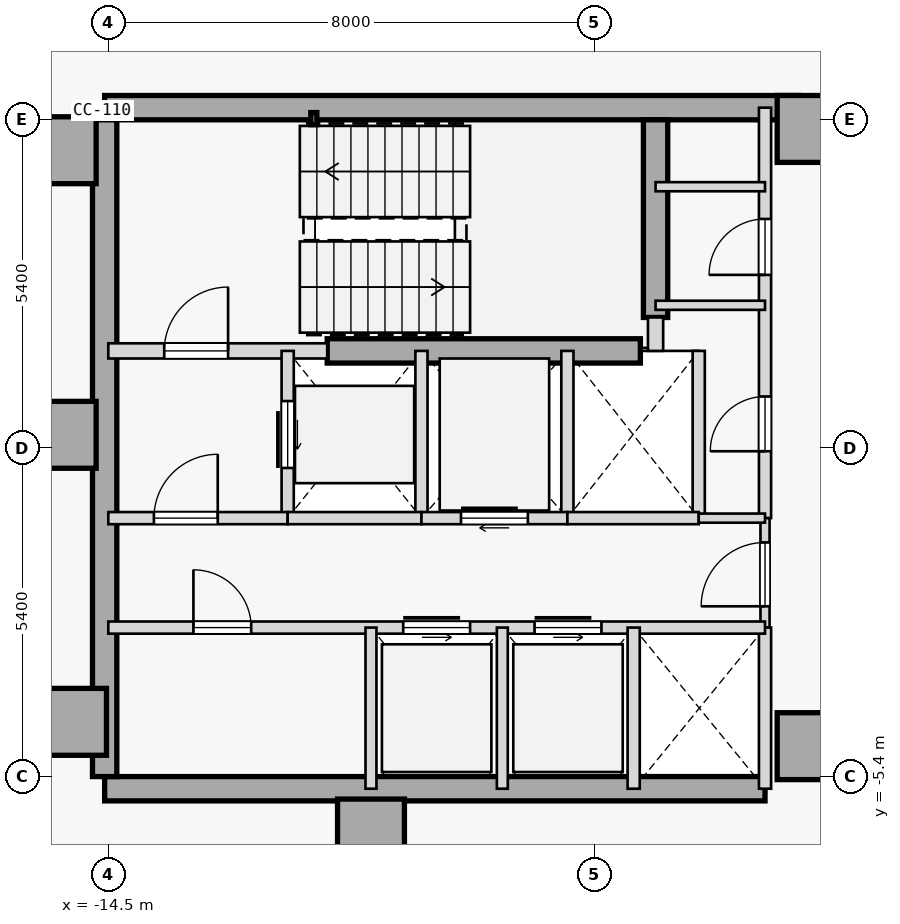
"""IFC4 building model, lengths in metres.
Left out: names, types, materials, properties, quantities, classifications, styles, units other than length and angle.
Written with IfcOpenShell. Run it as: python <this file> out.ifc"""

import sys

from ifc_helpers import new_model, si_unit, direction, frame, frame_2d, origin, origin_2d, place, context, subcontext, project, spatial, rectangle, hollow_rectangle, extrude, element, fill, save


model = new_model("IFC4")
c1 = context("Model", 3, precision=1e-05, world=origin(), true_north=direction((0.0, 1.0)))
c2 = subcontext(c1, "Body", "Model", "MODEL_VIEW")
j1 = project(units=[si_unit("LENGTHUNIT", "METRE"), si_unit("PLANEANGLEUNIT", "RADIAN")], contexts=[c1])
p1 = place(None, origin())
s1 = spatial("IfcSite", under=j1, at=p1, CompositionType="ELEMENT")
p2 = place(p1, origin())
s2 = spatial("IfcBuilding", under=s1, at=p2, CompositionType="ELEMENT")
p3 = place(p2, frame((0.0, 0.0, 113.3)))
s3 = spatial("IfcBuildingStorey", under=s2, at=p3, CompositionType="ELEMENT", Elevation=113.3)
for number, where, z_axis, x_axis in (
    (1, (-15.25, 4.9, 0.0), (0.0, 0.0, 1.0), (1.0, 0.0, 0.0)),
    (2, (-15.25, 0.22, 0.0), (0.0, 0.0, 1.0), (1.0, 0.0, 0.0)),
    (3, (-15.08, -4.5, 0.0), (0.0, 0.0, 1.0), (1.0, 0.0, 0.0)),
    (4, (-10.18, -6.32, 0.0), (0.0, 0.0, 1.0), (1.0, 0.0, 0.0)),
    (5, (-2.95, -4.9, 0.0), (0.0, 0.0, 1.0), (1.0, 0.0, 0.0)),
    (6, (-2.95, 5.25, 0.0), (0.0, 0.0, 1.0), (1.0, 0.0, 0.0)),
):
    element("IfcColumn", number, at=place(p3, frame(where, z_axis=z_axis, x_axis=x_axis)), inside=s3, PredefinedType="COLUMN", context=c2, shape_type="SweptSolid", body=[
        extrude(rectangle(XDim=1.1, YDim=1.1, at=origin_2d()), origin(), (0.0, 0.0, 1.0), 3.7),
    ])
p4 = place(p3, frame((-14.56, 5.6, 0.0), z_axis=(0.0, 0.0, 1.0), x_axis=(1.0, 0.0, 0.0)))
e7 = element("IfcWall", 7, at=p4, inside=s3, PredefinedType="SHEAR", context=c2, shape_type="SweptSolid", body=[
    extrude(rectangle(XDim=11.41, YDim=0.4, at=frame_2d((5.705, 0.0))), origin(), (0.0, 0.0, 1.0), 3.475),
])
p5 = place(p3, frame((-14.56, -5.6, 0.0), z_axis=(0.0, 0.0, 1.0), x_axis=(1.0, 0.0, 0.0)))
e8 = element("IfcWall", 8, at=p5, inside=s3, PredefinedType="SHEAR", context=c2, shape_type="SweptSolid", body=[
    extrude(rectangle(XDim=10.86, YDim=0.4, at=frame_2d((5.43, 0.0))), origin(), (0.0, 0.0, 1.0), 3.475),
])
p6 = place(p3, frame((-14.56, -5.4, 0.0), z_axis=(0.0, 0.0, 1.0), x_axis=(0.0, 1.0, 0.0)))
e9 = element("IfcWall", 9, at=p6, inside=s3, PredefinedType="SHEAR", context=c2, shape_type="SweptSolid", body=[
    extrude(rectangle(XDim=10.8, YDim=0.4, at=frame_2d((5.4, 0.0))), origin(), (0.0, 0.0, 1.0), 3.475),
])
p7 = place(p3, frame((-5.5, 2.15, 0.0), z_axis=(0.0, 0.0, 1.0), x_axis=(0.0, 1.0, 0.0)))
e10 = element("IfcWall", 10, at=p7, inside=s3, PredefinedType="SHEAR", context=c2, shape_type="SweptSolid", body=[
    extrude(rectangle(XDim=3.25, YDim=0.4, at=frame_2d((1.625, 0.0))), origin(), (0.0, 0.0, 1.0), 3.475),
])
p8 = place(p3, frame((-10.9, 1.6, 0.0), z_axis=(0.0, 0.0, 1.0), x_axis=(1.0, 0.0, 0.0)))
e11 = element("IfcWall", 11, at=p8, inside=s3, PredefinedType="SHEAR", context=c2, shape_type="SweptSolid", body=[
    extrude(rectangle(XDim=5.15, YDim=0.4, at=frame_2d((2.575, 0.0))), origin(), (0.0, 0.0, 1.0), 3.475),
])
p9 = place(p3, frame((-11.12, 5.42, 0.0), z_axis=(0.0, 0.0, 1.0), x_axis=(1.0, 0.0, 0.0)))
e12 = element("IfcColumn", 12, at=p9, inside=s3, PredefinedType="COLUMN", context=c2, shape_type="SweptSolid", body=[
    extrude(hollow_rectangle(XDim=0.1, YDim=0.2, WallThickness=0.008, at=origin_2d()), origin(), (0.0, 0.0, 1.0), 3.7),
])
p10 = place(p3, frame((-14.5, 1.6, 0.0), z_axis=(0.0, 0.0, 1.0), x_axis=(1.0, 0.0, 0.0)))
e13 = element("IfcWall", 13, at=p10, inside=s3, PredefinedType="STANDARD", context=c2, shape_type="SweptSolid", body=[
    extrude(rectangle(XDim=3.6, YDim=0.25, at=frame_2d((1.8, 0.0))), origin(), (0.0, 0.0, 1.0), 3.475),
])
p11 = place(p10, frame((0.92, 0.0, 0.0)))
e14 = element("IfcOpeningElement", 14, at=p11, cuts=e13, PredefinedType="OPENING", context=c2, shape_type="SweptSolid", body=[
    extrude(rectangle(XDim=1.05, YDim=2.15, at=frame_2d((0.525, 1.075))), frame((0.0, 0.135, 0.0), z_axis=(0.0, -1.0, 0.0), x_axis=(1.0, 0.0, 0.0)), (0.0, 0.0, 1.0), 0.27),
])
p12 = place(p3, frame((-5.5, 1.6, 0.0), z_axis=(0.0, 0.0, 1.0), x_axis=(0.0, 1.0, 0.0)))
e15 = element("IfcWall", 15, at=p12, inside=s3, PredefinedType="STANDARD", context=c2, shape_type="SweptSolid", body=[
    extrude(rectangle(XDim=0.55, YDim=0.25, at=frame_2d((0.275, 0.0))), origin(), (0.0, 0.0, 1.0), 3.475),
])
p13 = place(p3, frame((-3.7, -1.15, 0.0), z_axis=(0.0, 0.0, 1.0), x_axis=(0.0, 1.0, 0.0)))
e16 = element("IfcWall", 16, at=p13, inside=s3, PredefinedType="STANDARD", context=c2, shape_type="SweptSolid", body=[
    extrude(rectangle(XDim=6.75, YDim=0.2, at=frame_2d((3.375, 0.0))), origin(), (0.0, 0.0, 1.0), 3.475),
])
p14 = place(p13, frame((1.1, 0.0, 0.0)))
e17 = element("IfcOpeningElement", 17, at=p14, cuts=e16, PredefinedType="OPENING", context=c2, shape_type="SweptSolid", body=[
    extrude(rectangle(XDim=0.9, YDim=2.15, at=frame_2d((0.45, 1.075))), frame((0.0, 0.11, 0.0), z_axis=(0.0, -1.0, 0.0), x_axis=(1.0, 0.0, 0.0)), (0.0, 0.0, 1.0), 0.22),
])
p15 = place(p13, frame((4.0, 0.0, 0.0)))
e18 = element("IfcOpeningElement", 18, at=p15, cuts=e16, PredefinedType="OPENING", context=c2, shape_type="SweptSolid", body=[
    extrude(rectangle(XDim=0.92, YDim=2.15, at=frame_2d((0.46, 1.075))), frame((0.0, 0.11, 0.0), z_axis=(0.0, -1.0, 0.0), x_axis=(1.0, 0.0, 0.0)), (0.0, 0.0, 1.0), 0.22),
])
p16 = place(p3, frame((-3.7, -2.95, 0.0), z_axis=(0.0, 0.0, 1.0), x_axis=(0.0, 1.0, 0.0)))
e19 = element("IfcWall", 19, at=p16, inside=s3, PredefinedType="PARTITIONING", context=c2, shape_type="SweptSolid", body=[
    extrude(rectangle(XDim=1.8, YDim=0.15, at=frame_2d((0.9, 0.0))), origin(), (0.0, 0.0, 1.0), 3.475),
])
p17 = place(p16, frame((0.35, 0.0, 0.0)))
e20 = element("IfcOpeningElement", 20, at=p17, cuts=e19, PredefinedType="OPENING", context=c2, shape_type="SweptSolid", body=[
    extrude(rectangle(XDim=1.05, YDim=2.18, at=frame_2d((0.525, 1.09))), frame((0.0, 0.085, 0.0), z_axis=(0.0, -1.0, 0.0), x_axis=(1.0, 0.0, 0.0)), (0.0, 0.0, 1.0), 0.17),
])
p18 = place(p3, frame((-3.7, -5.6, 0.0), z_axis=(0.0, 0.0, 1.0), x_axis=(0.0, 1.0, 0.0)))
e21 = element("IfcWall", 21, at=p18, inside=s3, PredefinedType="STANDARD", context=c2, shape_type="SweptSolid", body=[
    extrude(rectangle(XDim=2.65, YDim=0.2, at=frame_2d((1.325, 0.0))), origin(), (0.0, 0.0, 1.0), 3.475),
])
p19 = place(p3, frame((-11.55, -1.15, 0.0), z_axis=(0.0, 0.0, 1.0), x_axis=(0.0, 1.0, 0.0)))
e22 = element("IfcWall", 22, at=p19, inside=s3, PredefinedType="STANDARD", context=c2, shape_type="SweptSolid", body=[
    extrude(rectangle(XDim=2.75, YDim=0.2, at=frame_2d((1.375, 0.0))), origin(), (0.0, 0.0, 1.0), 3.475),
])
p20 = place(p19, frame((0.825, 0.0, 0.0)))
e23 = element("IfcOpeningElement", 23, at=p20, cuts=e22, PredefinedType="OPENING", context=c2, shape_type="SweptSolid", body=[
    extrude(rectangle(XDim=1.1, YDim=2.15, at=frame_2d((0.55, 1.075))), frame((0.0, 0.11, 0.0), z_axis=(0.0, -1.0, 0.0), x_axis=(1.0, 0.0, 0.0)), (0.0, 0.0, 1.0), 0.22),
])
p21 = place(p3, frame((-9.35, -1.15, 0.0), z_axis=(0.0, 0.0, 1.0), x_axis=(0.0, 1.0, 0.0)))
e24 = element("IfcWall", 24, at=p21, inside=s3, PredefinedType="STANDARD", context=c2, shape_type="SweptSolid", body=[
    extrude(rectangle(XDim=2.75, YDim=0.2, at=frame_2d((1.375, 0.0))), origin(), (0.0, 0.0, 1.0), 3.475),
])
p22 = place(p3, frame((-14.5, -1.15, 0.0), z_axis=(0.0, 0.0, 1.0), x_axis=(1.0, 0.0, 0.0)))
e25 = element("IfcWall", 25, at=p22, inside=s3, PredefinedType="STANDARD", context=c2, shape_type="SweptSolid", body=[
    extrude(rectangle(XDim=2.95, YDim=0.2, at=frame_2d((1.475, 0.0))), origin(), (0.0, 0.0, 1.0), 3.475),
])
p23 = place(p22, frame((0.75, 0.0, 0.0)))
e26 = element("IfcOpeningElement", 26, at=p23, cuts=e25, PredefinedType="OPENING", context=c2, shape_type="SweptSolid", body=[
    extrude(rectangle(XDim=1.05, YDim=2.18, at=frame_2d((0.525, 1.09))), frame((0.0, 0.11, 0.0), z_axis=(0.0, -1.0, 0.0), x_axis=(1.0, 0.0, 0.0)), (0.0, 0.0, 1.0), 0.22),
])
p24 = place(p3, frame((-11.55, -1.15, 0.0), z_axis=(0.0, 0.0, 1.0), x_axis=(1.0, 0.0, 0.0)))
e27 = element("IfcWall", 27, at=p24, inside=s3, PredefinedType="STANDARD", context=c2, shape_type="SweptSolid", body=[
    extrude(rectangle(XDim=2.2, YDim=0.2, at=frame_2d((1.1, 0.0))), origin(), (0.0, 0.0, 1.0), 3.475),
])
p25 = place(p3, frame((-6.95, -1.15, 0.0), z_axis=(0.0, 0.0, 1.0), x_axis=(0.0, 1.0, 0.0)))
e28 = element("IfcWall", 28, at=p25, inside=s3, PredefinedType="STANDARD", context=c2, shape_type="SweptSolid", body=[
    extrude(rectangle(XDim=2.75, YDim=0.2, at=frame_2d((1.375, 0.0))), origin(), (0.0, 0.0, 1.0), 3.475),
])
p26 = place(p3, frame((-9.35, -1.15, 0.0), z_axis=(0.0, 0.0, 1.0), x_axis=(1.0, 0.0, 0.0)))
e29 = element("IfcWall", 29, at=p26, inside=s3, PredefinedType="STANDARD", context=c2, shape_type="SweptSolid", body=[
    extrude(rectangle(XDim=2.4, YDim=0.2, at=frame_2d((1.2, 0.0))), origin(), (0.0, 0.0, 1.0), 3.475),
])
p27 = place(p26, frame((0.65, 0.0, 0.0)))
e30 = element("IfcOpeningElement", 30, at=p27, cuts=e29, PredefinedType="OPENING", context=c2, shape_type="SweptSolid", body=[
    extrude(rectangle(XDim=1.1, YDim=2.15, at=frame_2d((0.55, 1.075))), frame((0.0, 0.11, 0.0), z_axis=(0.0, -1.0, 0.0), x_axis=(1.0, 0.0, 0.0)), (0.0, 0.0, 1.0), 0.22),
])
p28 = place(p3, frame((-4.79, -1.15, 0.0), z_axis=(0.0, 0.0, 1.0), x_axis=(0.0, 1.0, 0.0)))
e31 = element("IfcWall", 31, at=p28, inside=s3, PredefinedType="STANDARD", context=c2, shape_type="SweptSolid", body=[
    extrude(rectangle(XDim=2.75, YDim=0.2, at=frame_2d((1.375, 0.0))), origin(), (0.0, 0.0, 1.0), 3.475),
])
p29 = place(p3, frame((-6.95, -1.15, 0.0), z_axis=(0.0, 0.0, 1.0), x_axis=(1.0, 0.0, 0.0)))
e32 = element("IfcWall", 32, at=p29, inside=s3, PredefinedType="STANDARD", context=c2, shape_type="SweptSolid", body=[
    extrude(rectangle(XDim=2.16, YDim=0.2, at=frame_2d((1.08, 0.0))), origin(), (0.0, 0.0, 1.0), 3.475),
])
p30 = place(p3, frame((-4.79, -1.15, 0.0), z_axis=(0.0, 0.0, 1.0), x_axis=(1.0, 0.0, 0.0)))
e33 = element("IfcWall", 33, at=p30, inside=s3, PredefinedType="PARTITIONING", context=c2, shape_type="SweptSolid", body=[
    extrude(rectangle(XDim=1.09, YDim=0.15, at=frame_2d((0.545, 0.0))), origin(), (0.0, 0.0, 1.0), 3.475),
])
p31 = place(p3, frame((-14.5, -2.95, 0.0), z_axis=(0.0, 0.0, 1.0), x_axis=(1.0, 0.0, 0.0)))
e34 = element("IfcWall", 34, at=p31, inside=s3, PredefinedType="STANDARD", context=c2, shape_type="SweptSolid", body=[
    extrude(rectangle(XDim=10.8, YDim=0.2, at=frame_2d((5.4, 0.0))), origin(), (0.0, 0.0, 1.0), 3.475),
])
p32 = place(p31, frame((4.85, 0.0, 0.0)))
e35 = element("IfcOpeningElement", 35, at=p32, cuts=e34, PredefinedType="OPENING", context=c2, shape_type="SweptSolid", body=[
    extrude(rectangle(XDim=1.1, YDim=2.15, at=frame_2d((0.55, 1.075))), frame((0.0, 0.11, 0.0), z_axis=(0.0, -1.0, 0.0), x_axis=(1.0, 0.0, 0.0)), (0.0, 0.0, 1.0), 0.22),
])
p33 = place(p31, frame((7.01, 0.0, 0.0)))
e36 = element("IfcOpeningElement", 36, at=p33, cuts=e34, PredefinedType="OPENING", context=c2, shape_type="SweptSolid", body=[
    extrude(rectangle(XDim=1.1, YDim=2.15, at=frame_2d((0.55, 1.075))), frame((0.0, 0.11, 0.0), z_axis=(0.0, -1.0, 0.0), x_axis=(1.0, 0.0, 0.0)), (0.0, 0.0, 1.0), 0.22),
])
p34 = place(p31, frame((1.4, 0.0, 0.0)))
e37 = element("IfcOpeningElement", 37, at=p34, cuts=e34, PredefinedType="OPENING", context=c2, shape_type="SweptSolid", body=[
    extrude(rectangle(XDim=0.95, YDim=2.15, at=frame_2d((0.475, 1.075))), frame((0.0, 0.11, 0.0), z_axis=(0.0, -1.0, 0.0), x_axis=(1.0, 0.0, 0.0)), (0.0, 0.0, 1.0), 0.22),
])
p35 = place(p3, frame((-5.86, -5.6, 0.0), z_axis=(0.0, 0.0, 1.0), x_axis=(0.0, 1.0, 0.0)))
e38 = element("IfcWall", 38, at=p35, inside=s3, PredefinedType="STANDARD", context=c2, shape_type="SweptSolid", body=[
    extrude(rectangle(XDim=2.65, YDim=0.2, at=frame_2d((1.325, 0.0))), origin(), (0.0, 0.0, 1.0), 3.475),
])
for number, where, z_axis, x_axis in (
    (39, (-10.18, -5.6, 0.0), (0.0, 0.0, 1.0), (0.0, 1.0, 0.0)),
    (40, (-8.02, -5.6, 0.0), (0.0, 0.0, 1.0), (0.0, 1.0, 0.0)),
):
    element("IfcWall", number, at=place(p3, frame(where, z_axis=z_axis, x_axis=x_axis)), inside=s3, PredefinedType="STANDARD", context=c2, shape_type="SweptSolid", body=[
        extrude(rectangle(XDim=2.65, YDim=0.18, at=frame_2d((1.325, 0.0))), origin(), (0.0, 0.0, 1.0), 3.475),
    ])
for number, where, z_axis, x_axis in (
    (41, (-5.5, 4.3, 0.0), (0.0, 0.0, 1.0), (1.0, 0.0, 0.0)),
    (42, (-5.5, 2.35, 0.0), (0.0, 0.0, 1.0), (1.0, 0.0, 0.0)),
):
    element("IfcWall", number, at=place(p3, frame(where, z_axis=z_axis, x_axis=x_axis)), inside=s3, PredefinedType="PARTITIONING", context=c2, shape_type="SweptSolid", body=[
        extrude(rectangle(XDim=1.8, YDim=0.15, at=frame_2d((0.9, 0.0))), origin(), (0.0, 0.0, 1.0), 3.475),
    ])
p36 = place(p11, origin())
e43 = element("IfcDoor", 43, at=p36, inside=s3, OperationType="SINGLE_SWING_RIGHT", PredefinedType="DOOR", context=c2, shape_type="SweptSolid", body=[
    extrude(rectangle(XDim=1.05, YDim=2.15, at=frame_2d((0.525, 1.075))), frame((0.0, 0.025, 0.0), z_axis=(0.0, -1.0, 0.0), x_axis=(1.0, 0.0, 0.0)), (0.0, 0.0, 1.0), 0.05),
])
fill(e14, e43)
p37 = place(p23, origin())
e44 = element("IfcDoor", 44, at=p37, inside=s3, OperationType="SINGLE_SWING_RIGHT", PredefinedType="DOOR", context=c2, shape_type="SweptSolid", body=[
    extrude(rectangle(XDim=1.05, YDim=2.18, at=frame_2d((0.525, 1.09))), frame((0.0, 0.025, 0.0), z_axis=(0.0, -1.0, 0.0), x_axis=(1.0, 0.0, 0.0)), (0.0, 0.0, 1.0), 0.05),
])
fill(e26, e44)
p38 = place(p17, origin())
e45 = element("IfcDoor", 45, at=p38, inside=s3, OperationType="SINGLE_SWING_LEFT", PredefinedType="DOOR", context=c2, shape_type="SweptSolid", body=[
    extrude(rectangle(XDim=1.05, YDim=2.18, at=frame_2d((0.525, 1.09))), frame((0.0, 0.025, 0.0), z_axis=(0.0, -1.0, 0.0), x_axis=(1.0, 0.0, 0.0)), (0.0, 0.0, 1.0), 0.05),
])
fill(e20, e45)
p39 = place(p20, origin())
e46 = element("IfcDoor", 46, at=p39, inside=s3, OperationType="SLIDING_TO_RIGHT", PredefinedType="DOOR", context=c2, shape_type="SweptSolid", body=[
    extrude(rectangle(XDim=1.1, YDim=2.15, at=frame_2d((0.55, 1.075))), frame((0.0, 0.025, 0.0), z_axis=(0.0, -1.0, 0.0), x_axis=(1.0, 0.0, 0.0)), (0.0, 0.0, 1.0), 0.05),
])
fill(e23, e46)
p40 = place(p27, origin())
e47 = element("IfcDoor", 47, at=p40, inside=s3, OperationType="SLIDING_TO_RIGHT", PredefinedType="DOOR", context=c2, shape_type="SweptSolid", body=[
    extrude(rectangle(XDim=1.1, YDim=2.15, at=frame_2d((0.55, 1.075))), frame((0.0, 0.025, 0.0), z_axis=(0.0, -1.0, 0.0), x_axis=(1.0, 0.0, 0.0)), (0.0, 0.0, 1.0), 0.05),
])
fill(e30, e47)
p41 = place(p32, origin())
e48 = element("IfcDoor", 48, at=p41, inside=s3, OperationType="SLIDING_TO_LEFT", PredefinedType="DOOR", context=c2, shape_type="SweptSolid", body=[
    extrude(rectangle(XDim=1.1, YDim=2.15, at=frame_2d((0.55, 1.075))), frame((0.0, 0.025, 0.0), z_axis=(0.0, -1.0, 0.0), x_axis=(1.0, 0.0, 0.0)), (0.0, 0.0, 1.0), 0.05),
])
fill(e35, e48)
p42 = place(p33, origin())
e49 = element("IfcDoor", 49, at=p42, inside=s3, OperationType="SLIDING_TO_LEFT", PredefinedType="DOOR", context=c2, shape_type="SweptSolid", body=[
    extrude(rectangle(XDim=1.1, YDim=2.15, at=frame_2d((0.55, 1.075))), frame((0.0, 0.025, 0.0), z_axis=(0.0, -1.0, 0.0), x_axis=(1.0, 0.0, 0.0)), (0.0, 0.0, 1.0), 0.05),
])
fill(e36, e49)
p43 = place(p34, origin())
e50 = element("IfcDoor", 50, at=p43, inside=s3, OperationType="SINGLE_SWING_LEFT", PredefinedType="DOOR", context=c2, shape_type="SweptSolid", body=[
    extrude(rectangle(XDim=0.95, YDim=2.15, at=frame_2d((0.475, 1.075))), frame((0.0, 0.025, 0.0), z_axis=(0.0, -1.0, 0.0), x_axis=(1.0, 0.0, 0.0)), (0.0, 0.0, 1.0), 0.05),
])
fill(e37, e50)
p44 = place(p14, origin())
e51 = element("IfcDoor", 51, at=p44, inside=s3, OperationType="SINGLE_SWING_LEFT", PredefinedType="DOOR", context=c2, shape_type="SweptSolid", body=[
    extrude(rectangle(XDim=0.9, YDim=2.15, at=frame_2d((0.45, 1.075))), frame((0.0, 0.025, 0.0), z_axis=(0.0, -1.0, 0.0), x_axis=(1.0, 0.0, 0.0)), (0.0, 0.0, 1.0), 0.05),
])
fill(e17, e51)
p45 = place(p15, origin())
e52 = element("IfcDoor", 52, at=p45, inside=s3, OperationType="SINGLE_SWING_LEFT", PredefinedType="DOOR", context=c2, shape_type="SweptSolid", body=[
    extrude(rectangle(XDim=0.92, YDim=2.15, at=frame_2d((0.46, 1.075))), frame((0.0, 0.025, 0.0), z_axis=(0.0, -1.0, 0.0), x_axis=(1.0, 0.0, 0.0)), (0.0, 0.0, 1.0), 0.05),
])
fill(e18, e52)
save(model, sys.argv[1])
